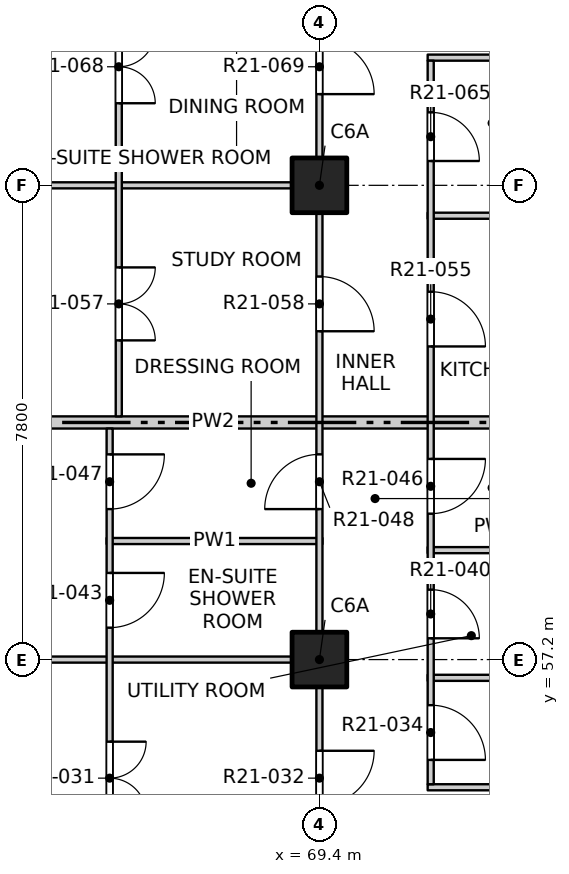
"""IFC4 building model, lengths in metres.
Left out: names, types, materials, properties, quantities, classifications, styles, units other than length and angle.
Written with IfcOpenShell. Run it as: python <this file> out.ifc"""

import sys

from ifc_helpers import new_model, si_unit, direction, frame, frame_2d, origin, origin_2d, place, context, subcontext, project, spatial, rectangle, extrude, element, fill, save


model = new_model("IFC4")
c1 = context("Model", 3, precision=1e-05, world=origin(), true_north=direction((0.0, 1.0)))
c2 = subcontext(c1, "Body", "Model", "MODEL_VIEW")
j1 = project(units=[si_unit("LENGTHUNIT", "METRE"), si_unit("PLANEANGLEUNIT", "RADIAN")], contexts=[c1])
p1 = place(None, origin())
s1 = spatial("IfcSite", under=j1, at=p1, CompositionType="ELEMENT")
p2 = place(p1, origin())
s2 = spatial("IfcBuilding", under=s1, at=p2, CompositionType="ELEMENT")
p3 = place(p2, frame((0.0, 0.0, 221.1)))
s3 = spatial("IfcBuildingStorey", under=s2, at=p3, CompositionType="ELEMENT", Elevation=221.1)
for number, where, z_axis, x_axis in (
    (1, (69.4, 57.2, -0.25), (0.0, 0.0, 1.0), (1.0, 0.0, 0.0)),
    (2, (69.4, 65.0, -0.25), (0.0, 0.0, 1.0), (1.0, 0.0, 0.0)),
):
    element("IfcColumn", number, at=place(p3, frame(where, z_axis=z_axis, x_axis=x_axis)), inside=s3, PredefinedType="COLUMN", context=c2, shape_type="SweptSolid", body=[
        extrude(rectangle(XDim=0.9, YDim=0.9, at=origin_2d()), origin(), (0.0, 0.0, 1.0), 3.4),
    ])
for number, where, z_axis, x_axis in (
    (3, (71.18, 55.1, 0.0), (0.0, 0.0, 1.0), (1.0, 0.0, 0.0)),
    (4, (71.18, 56.9, 0.0), (0.0, 0.0, 1.0), (1.0, 0.0, 0.0)),
):
    element("IfcWall", number, at=place(p3, frame(where, z_axis=z_axis, x_axis=x_axis)), inside=s3, PredefinedType="PARTITIONING", context=c2, shape_type="SweptSolid", body=[
        extrude(rectangle(XDim=2.22, YDim=0.1, at=frame_2d((1.11, 0.0))), origin(), (0.0, 0.0, 1.0), 3.15),
    ])
p4 = place(p3, frame((61.9, 57.2, 0.0), z_axis=(0.0, 0.0, 1.0), x_axis=(1.0, 0.0, 0.0)))
e5 = element("IfcWall", 5, at=p4, inside=s3, PredefinedType="PARTITIONING", context=c2, shape_type="SweptSolid", body=[
    extrude(rectangle(XDim=7.55, YDim=0.1, at=frame_2d((3.775, 0.0))), origin(), (0.0, 0.0, 1.0), 3.15),
])
p5 = place(p3, frame((71.18, 59.0, 0.0), z_axis=(0.0, 0.0, 1.0), x_axis=(1.0, 0.0, 0.0)))
e6 = element("IfcWall", 6, at=p5, inside=s3, PredefinedType="PARTITIONING", context=c2, shape_type="SweptSolid", body=[
    extrude(rectangle(XDim=2.22, YDim=0.1, at=frame_2d((1.11, 0.0))), origin(), (0.0, 0.0, 1.0), 3.15),
])
p6 = place(p3, frame((65.9, 59.15, 0.0), z_axis=(0.0, 0.0, 1.0), x_axis=(1.0, 0.0, 0.0)))
e7 = element("IfcWall", 7, at=p6, inside=s3, PredefinedType="PARTITIONING", context=c2, shape_type="SweptSolid", body=[
    extrude(rectangle(XDim=3.55, YDim=0.1, at=frame_2d((1.775, 0.0))), origin(), (0.0, 0.0, 1.0), 3.15),
])
p7 = place(p3, frame((61.9, 61.1, 0.0), z_axis=(0.0, 0.0, 1.0), x_axis=(1.0, 0.0, 0.0)))
e8 = element("IfcWall", 8, at=p7, inside=s3, PredefinedType="PARTITIONING", context=c2, shape_type="SweptSolid", body=[
    extrude(rectangle(XDim=11.5, YDim=0.2, at=frame_2d((5.75, 0.0))), origin(), (0.0, 0.0, 1.0), 2.55),
])
p8 = place(p3, frame((71.18, 64.5, 0.0), z_axis=(0.0, 0.0, 1.0), x_axis=(1.0, 0.0, 0.0)))
e9 = element("IfcWall", 9, at=p8, inside=s3, PredefinedType="PARTITIONING", context=c2, shape_type="SweptSolid", body=[
    extrude(rectangle(XDim=2.22, YDim=0.1, at=frame_2d((1.11, 0.0))), origin(), (0.0, 0.0, 1.0), 3.15),
])
p9 = place(p3, frame((61.9, 65.0, 0.0), z_axis=(0.0, 0.0, 1.0), x_axis=(1.0, 0.0, 0.0)))
e10 = element("IfcWall", 10, at=p9, inside=s3, PredefinedType="PARTITIONING", context=c2, shape_type="SweptSolid", body=[
    extrude(rectangle(XDim=7.55, YDim=0.1, at=frame_2d((3.775, 0.0))), origin(), (0.0, 0.0, 1.0), 3.15),
])
p10 = place(p3, frame((71.18, 67.1, 0.0), z_axis=(0.0, 0.0, 1.0), x_axis=(1.0, 0.0, 0.0)))
e11 = element("IfcWall", 11, at=p10, inside=s3, PredefinedType="PARTITIONING", context=c2, shape_type="SweptSolid", body=[
    extrude(rectangle(XDim=2.22, YDim=0.1, at=frame_2d((1.11, 0.0))), origin(), (0.0, 0.0, 1.0), 3.15),
])
p11 = place(p3, frame((65.95, 41.9, 0.0), z_axis=(0.0, 0.0, 1.0), x_axis=(0.0, 1.0, 0.0)))
e12 = element("IfcWall", 12, at=p11, inside=s3, PredefinedType="PARTITIONING", context=c2, shape_type="SweptSolid", body=[
    extrude(rectangle(XDim=19.1, YDim=0.1, at=frame_2d((9.55, 0.0))), origin(), (0.0, 0.0, 1.0), 3.15),
])
p12 = place(p11, frame((1.05, 0.0, 0.0)))
e13 = element("IfcOpeningElement", 13, at=p12, cuts=e12, PredefinedType="OPENING", context=c2, shape_type="SweptSolid", body=[
    extrude(rectangle(XDim=1.2, YDim=2.1, at=frame_2d((0.6, 1.05))), frame((0.0, 0.06, 0.0), z_axis=(0.0, -1.0, 0.0), x_axis=(1.0, 0.0, 0.0)), (0.0, 0.0, 1.0), 0.12),
])
p13 = place(p11, frame((4.125, 0.0, 0.0)))
e14 = element("IfcOpeningElement", 14, at=p13, cuts=e12, PredefinedType="OPENING", context=c2, shape_type="SweptSolid", body=[
    extrude(rectangle(XDim=0.9, YDim=2.1, at=frame_2d((0.45, 1.05))), frame((0.0, 0.06, 0.0), z_axis=(0.0, -1.0, 0.0), x_axis=(1.0, 0.0, 0.0)), (0.0, 0.0, 1.0), 0.12),
])
p14 = place(p11, frame((6.075, 0.0, 0.0)))
e15 = element("IfcOpeningElement", 15, at=p14, cuts=e12, PredefinedType="OPENING", context=c2, shape_type="SweptSolid", body=[
    extrude(rectangle(XDim=0.9, YDim=2.1, at=frame_2d((0.45, 1.05))), frame((0.0, 0.06, 0.0), z_axis=(0.0, -1.0, 0.0), x_axis=(1.0, 0.0, 0.0)), (0.0, 0.0, 1.0), 0.12),
])
p15 = place(p11, frame((8.85, 0.0, 0.0)))
e16 = element("IfcOpeningElement", 16, at=p15, cuts=e12, PredefinedType="OPENING", context=c2, shape_type="SweptSolid", body=[
    extrude(rectangle(XDim=1.2, YDim=2.1, at=frame_2d((0.6, 1.05))), frame((0.0, 0.06, 0.0), z_axis=(0.0, -1.0, 0.0), x_axis=(1.0, 0.0, 0.0)), (0.0, 0.0, 1.0), 0.12),
])
p16 = place(p11, frame((12.75, 0.0, 0.0)))
e17 = element("IfcOpeningElement", 17, at=p16, cuts=e12, PredefinedType="OPENING", context=c2, shape_type="SweptSolid", body=[
    extrude(rectangle(XDim=1.2, YDim=2.1, at=frame_2d((0.6, 1.05))), frame((0.0, 0.06, 0.0), z_axis=(0.0, -1.0, 0.0), x_axis=(1.0, 0.0, 0.0)), (0.0, 0.0, 1.0), 0.12),
])
p17 = place(p11, frame((15.825, 0.0, 0.0)))
e18 = element("IfcOpeningElement", 18, at=p17, cuts=e12, PredefinedType="OPENING", context=c2, shape_type="SweptSolid", body=[
    extrude(rectangle(XDim=0.9, YDim=2.1, at=frame_2d((0.45, 1.05))), frame((0.0, 0.06, 0.0), z_axis=(0.0, -1.0, 0.0), x_axis=(1.0, 0.0, 0.0)), (0.0, 0.0, 1.0), 0.12),
])
p18 = place(p11, frame((17.775, 0.0, 0.0)))
e19 = element("IfcOpeningElement", 19, at=p18, cuts=e12, PredefinedType="OPENING", context=c2, shape_type="SweptSolid", body=[
    extrude(rectangle(XDim=0.9, YDim=2.1, at=frame_2d((0.45, 1.05))), frame((0.0, 0.06, 0.0), z_axis=(0.0, -1.0, 0.0), x_axis=(1.0, 0.0, 0.0)), (0.0, 0.0, 1.0), 0.12),
])
p19 = place(p3, frame((66.1, 61.2, 0.0), z_axis=(0.0, 0.0, 1.0), x_axis=(0.0, 1.0, 0.0)))
e20 = element("IfcWall", 20, at=p19, inside=s3, PredefinedType="PARTITIONING", context=c2, shape_type="SweptSolid", body=[
    extrude(rectangle(XDim=26.9, YDim=0.1, at=frame_2d((13.45, 0.0))), origin(), (0.0, 0.0, 1.0), 3.15),
])
p20 = place(p19, frame((1.25, 0.0, 0.0)))
e21 = element("IfcOpeningElement", 21, at=p20, cuts=e20, PredefinedType="OPENING", context=c2, shape_type="SweptSolid", body=[
    extrude(rectangle(XDim=1.2, YDim=2.1, at=frame_2d((0.6, 1.05))), frame((0.0, 0.06, 0.0), z_axis=(0.0, -1.0, 0.0), x_axis=(1.0, 0.0, 0.0)), (0.0, 0.0, 1.0), 0.12),
])
p21 = place(p19, frame((5.15, 0.0, 0.0)))
e22 = element("IfcOpeningElement", 22, at=p21, cuts=e20, PredefinedType="OPENING", context=c2, shape_type="SweptSolid", body=[
    extrude(rectangle(XDim=1.2, YDim=2.1, at=frame_2d((0.6, 1.05))), frame((0.0, 0.06, 0.0), z_axis=(0.0, -1.0, 0.0), x_axis=(1.0, 0.0, 0.0)), (0.0, 0.0, 1.0), 0.12),
])
p22 = place(p19, frame((8.225, 0.0, 0.0)))
e23 = element("IfcOpeningElement", 23, at=p22, cuts=e20, PredefinedType="OPENING", context=c2, shape_type="SweptSolid", body=[
    extrude(rectangle(XDim=0.9, YDim=2.1, at=frame_2d((0.45, 1.05))), frame((0.0, 0.06, 0.0), z_axis=(0.0, -1.0, 0.0), x_axis=(1.0, 0.0, 0.0)), (0.0, 0.0, 1.0), 0.12),
])
p23 = place(p19, frame((10.175, 0.0, 0.0)))
e24 = element("IfcOpeningElement", 24, at=p23, cuts=e20, PredefinedType="OPENING", context=c2, shape_type="SweptSolid", body=[
    extrude(rectangle(XDim=0.9, YDim=2.1, at=frame_2d((0.45, 1.05))), frame((0.0, 0.06, 0.0), z_axis=(0.0, -1.0, 0.0), x_axis=(1.0, 0.0, 0.0)), (0.0, 0.0, 1.0), 0.12),
])
p24 = place(p19, frame((12.125, 0.0, 0.0)))
e25 = element("IfcOpeningElement", 25, at=p24, cuts=e20, PredefinedType="OPENING", context=c2, shape_type="SweptSolid", body=[
    extrude(rectangle(XDim=0.9, YDim=2.1, at=frame_2d((0.45, 1.05))), frame((0.0, 0.06, 0.0), z_axis=(0.0, -1.0, 0.0), x_axis=(1.0, 0.0, 0.0)), (0.0, 0.0, 1.0), 0.12),
])
p25 = place(p19, frame((14.075, 0.0, 0.0)))
e26 = element("IfcOpeningElement", 26, at=p25, cuts=e20, PredefinedType="OPENING", context=c2, shape_type="SweptSolid", body=[
    extrude(rectangle(XDim=0.9, YDim=2.1, at=frame_2d((0.45, 1.05))), frame((0.0, 0.06, 0.0), z_axis=(0.0, -1.0, 0.0), x_axis=(1.0, 0.0, 0.0)), (0.0, 0.0, 1.0), 0.12),
])
p26 = place(p19, frame((16.85, 0.0, 0.0)))
e27 = element("IfcOpeningElement", 27, at=p26, cuts=e20, PredefinedType="OPENING", context=c2, shape_type="SweptSolid", body=[
    extrude(rectangle(XDim=1.2, YDim=2.1, at=frame_2d((0.6, 1.05))), frame((0.0, 0.06, 0.0), z_axis=(0.0, -1.0, 0.0), x_axis=(1.0, 0.0, 0.0)), (0.0, 0.0, 1.0), 0.12),
])
p27 = place(p19, frame((19.925, 0.0, 0.0)))
e28 = element("IfcOpeningElement", 28, at=p27, cuts=e20, PredefinedType="OPENING", context=c2, shape_type="SweptSolid", body=[
    extrude(rectangle(XDim=0.9, YDim=2.1, at=frame_2d((0.45, 1.05))), frame((0.0, 0.06, 0.0), z_axis=(0.0, -1.0, 0.0), x_axis=(1.0, 0.0, 0.0)), (0.0, 0.0, 1.0), 0.12),
])
p28 = place(p19, frame((21.875, 0.0, 0.0)))
e29 = element("IfcOpeningElement", 29, at=p28, cuts=e20, PredefinedType="OPENING", context=c2, shape_type="SweptSolid", body=[
    extrude(rectangle(XDim=0.9, YDim=2.1, at=frame_2d((0.45, 1.05))), frame((0.0, 0.06, 0.0), z_axis=(0.0, -1.0, 0.0), x_axis=(1.0, 0.0, 0.0)), (0.0, 0.0, 1.0), 0.12),
])
p29 = place(p19, frame((24.65, 0.0, 0.0)))
e30 = element("IfcOpeningElement", 30, at=p29, cuts=e20, PredefinedType="OPENING", context=c2, shape_type="SweptSolid", body=[
    extrude(rectangle(XDim=1.2, YDim=2.1, at=frame_2d((0.6, 1.05))), frame((0.0, 0.06, 0.0), z_axis=(0.0, -1.0, 0.0), x_axis=(1.0, 0.0, 0.0)), (0.0, 0.0, 1.0), 0.12),
])
p30 = place(p3, frame((69.4, 41.9, 0.0), z_axis=(0.0, 0.0, 1.0), x_axis=(0.0, 1.0, 0.0)))
e31 = element("IfcWall", 31, at=p30, inside=s3, PredefinedType="PARTITIONING", context=c2, shape_type="SweptSolid", body=[
    extrude(rectangle(XDim=46.2, YDim=0.1, at=frame_2d((23.1, 0.0))), origin(), (0.0, 0.0, 1.0), 3.15),
])
p31 = place(p30, frame((1.2, 0.0, 0.0)))
e32 = element("IfcOpeningElement", 32, at=p31, cuts=e31, PredefinedType="OPENING", context=c2, shape_type="SweptSolid", body=[
    extrude(rectangle(XDim=0.9, YDim=2.1, at=frame_2d((0.45, 1.05))), frame((0.0, 0.06, 0.0), z_axis=(0.0, -1.0, 0.0), x_axis=(1.0, 0.0, 0.0)), (0.0, 0.0, 1.0), 0.12),
])
p32 = place(p30, frame((6.025, 0.0, 0.0)))
e33 = element("IfcOpeningElement", 33, at=p32, cuts=e31, PredefinedType="OPENING", context=c2, shape_type="SweptSolid", body=[
    extrude(rectangle(XDim=0.9, YDim=2.1, at=frame_2d((0.45, 1.05))), frame((0.0, 0.06, 0.0), z_axis=(0.0, -1.0, 0.0), x_axis=(1.0, 0.0, 0.0)), (0.0, 0.0, 1.0), 0.12),
])
p33 = place(p30, frame((9.0, 0.0, 0.0)))
e34 = element("IfcOpeningElement", 34, at=p33, cuts=e31, PredefinedType="OPENING", context=c2, shape_type="SweptSolid", body=[
    extrude(rectangle(XDim=0.9, YDim=2.1, at=frame_2d((0.45, 1.05))), frame((0.0, 0.06, 0.0), z_axis=(0.0, -1.0, 0.0), x_axis=(1.0, 0.0, 0.0)), (0.0, 0.0, 1.0), 0.12),
])
p34 = place(p30, frame((12.9, 0.0, 0.0)))
e35 = element("IfcOpeningElement", 35, at=p34, cuts=e31, PredefinedType="OPENING", context=c2, shape_type="SweptSolid", body=[
    extrude(rectangle(XDim=0.9, YDim=2.1, at=frame_2d((0.45, 1.05))), frame((0.0, 0.06, 0.0), z_axis=(0.0, -1.0, 0.0), x_axis=(1.0, 0.0, 0.0)), (0.0, 0.0, 1.0), 0.12),
])
p35 = place(p30, frame((17.775, 0.0, 0.0)))
e36 = element("IfcOpeningElement", 36, at=p35, cuts=e31, PredefinedType="OPENING", context=c2, shape_type="SweptSolid", body=[
    extrude(rectangle(XDim=0.9, YDim=2.1, at=frame_2d((0.45, 1.05))), frame((0.0, 0.06, 0.0), z_axis=(0.0, -1.0, 0.0), x_axis=(1.0, 0.0, 0.0)), (0.0, 0.0, 1.0), 0.12),
])
p36 = place(p30, frame((20.7, 0.0, 0.0)))
e37 = element("IfcOpeningElement", 37, at=p36, cuts=e31, PredefinedType="OPENING", context=c2, shape_type="SweptSolid", body=[
    extrude(rectangle(XDim=0.9, YDim=2.1, at=frame_2d((0.45, 1.05))), frame((0.0, 0.06, 0.0), z_axis=(0.0, -1.0, 0.0), x_axis=(1.0, 0.0, 0.0)), (0.0, 0.0, 1.0), 0.12),
])
p37 = place(p30, frame((24.6, 0.0, 0.0)))
e38 = element("IfcOpeningElement", 38, at=p37, cuts=e31, PredefinedType="OPENING", context=c2, shape_type="SweptSolid", body=[
    extrude(rectangle(XDim=0.9, YDim=2.1, at=frame_2d((0.45, 1.05))), frame((0.0, 0.06, 0.0), z_axis=(0.0, -1.0, 0.0), x_axis=(1.0, 0.0, 0.0)), (0.0, 0.0, 1.0), 0.12),
])
p38 = place(p30, frame((29.425, 0.0, 0.0)))
e39 = element("IfcOpeningElement", 39, at=p38, cuts=e31, PredefinedType="OPENING", context=c2, shape_type="SweptSolid", body=[
    extrude(rectangle(XDim=0.9, YDim=2.1, at=frame_2d((0.45, 1.05))), frame((0.0, 0.06, 0.0), z_axis=(0.0, -1.0, 0.0), x_axis=(1.0, 0.0, 0.0)), (0.0, 0.0, 1.0), 0.12),
])
p39 = place(p30, frame((33.375, 0.0, 0.0)))
e40 = element("IfcOpeningElement", 40, at=p39, cuts=e31, PredefinedType="OPENING", context=c2, shape_type="SweptSolid", body=[
    extrude(rectangle(XDim=0.9, YDim=2.1, at=frame_2d((0.45, 1.05))), frame((0.0, 0.06, 0.0), z_axis=(0.0, -1.0, 0.0), x_axis=(1.0, 0.0, 0.0)), (0.0, 0.0, 1.0), 0.12),
])
p40 = place(p30, frame((36.3, 0.0, 0.0)))
e41 = element("IfcOpeningElement", 41, at=p40, cuts=e31, PredefinedType="OPENING", context=c2, shape_type="SweptSolid", body=[
    extrude(rectangle(XDim=0.9, YDim=2.1, at=frame_2d((0.45, 1.05))), frame((0.0, 0.06, 0.0), z_axis=(0.0, -1.0, 0.0), x_axis=(1.0, 0.0, 0.0)), (0.0, 0.0, 1.0), 0.12),
])
p41 = place(p30, frame((41.175, 0.0, 0.0)))
e42 = element("IfcOpeningElement", 42, at=p41, cuts=e31, PredefinedType="OPENING", context=c2, shape_type="SweptSolid", body=[
    extrude(rectangle(XDim=0.9, YDim=2.1, at=frame_2d((0.45, 1.05))), frame((0.0, 0.06, 0.0), z_axis=(0.0, -1.0, 0.0), x_axis=(1.0, 0.0, 0.0)), (0.0, 0.0, 1.0), 0.12),
])
p42 = place(p30, frame((44.1, 0.0, 0.0)))
e43 = element("IfcOpeningElement", 43, at=p42, cuts=e31, PredefinedType="OPENING", context=c2, shape_type="SweptSolid", body=[
    extrude(rectangle(XDim=0.9, YDim=2.1, at=frame_2d((0.45, 1.05))), frame((0.0, 0.06, 0.0), z_axis=(0.0, -1.0, 0.0), x_axis=(1.0, 0.0, 0.0)), (0.0, 0.0, 1.0), 0.12),
])
p43 = place(p3, frame((71.23, 55.15, 0.0), z_axis=(0.0, 0.0, 1.0), x_axis=(0.0, 1.0, 0.0)))
e44 = element("IfcWall", 44, at=p43, inside=s3, PredefinedType="PARTITIONING", context=c2, shape_type="SweptSolid", body=[
    extrude(rectangle(XDim=11.9, YDim=0.1, at=frame_2d((5.95, 0.0))), origin(), (0.0, 0.0, 1.0), 3.15),
])
p44 = place(p43, frame((0.4, 0.0, 0.0)))
e45 = element("IfcOpeningElement", 45, at=p44, cuts=e44, PredefinedType="OPENING", context=c2, shape_type="SweptSolid", body=[
    extrude(rectangle(XDim=0.9, YDim=2.1, at=frame_2d((0.45, 1.05))), frame((0.0, 0.06, 0.0), z_axis=(0.0, -1.0, 0.0), x_axis=(1.0, 0.0, 0.0)), (0.0, 0.0, 1.0), 0.12),
])
p45 = place(p43, frame((2.4, 0.0, 0.0)))
e46 = element("IfcOpeningElement", 46, at=p45, cuts=e44, PredefinedType="OPENING", context=c2, shape_type="SweptSolid", body=[
    extrude(rectangle(XDim=0.8, YDim=2.1, at=frame_2d((0.4, 1.05))), frame((0.0, 0.06, 0.0), z_axis=(0.0, -1.0, 0.0), x_axis=(1.0, 0.0, 0.0)), (0.0, 0.0, 1.0), 0.12),
])
p46 = place(p43, frame((4.45, 0.0, 0.0)))
e47 = element("IfcOpeningElement", 47, at=p46, cuts=e44, PredefinedType="OPENING", context=c2, shape_type="SweptSolid", body=[
    extrude(rectangle(XDim=0.9, YDim=2.1, at=frame_2d((0.45, 1.05))), frame((0.0, 0.06, 0.0), z_axis=(0.0, -1.0, 0.0), x_axis=(1.0, 0.0, 0.0)), (0.0, 0.0, 1.0), 0.12),
])
p47 = place(p43, frame((7.2, 0.0, 0.0)))
e48 = element("IfcOpeningElement", 48, at=p47, cuts=e44, PredefinedType="OPENING", context=c2, shape_type="SweptSolid", body=[
    extrude(rectangle(XDim=0.9, YDim=2.1, at=frame_2d((0.45, 1.05))), frame((0.0, 0.06, 0.0), z_axis=(0.0, -1.0, 0.0), x_axis=(1.0, 0.0, 0.0)), (0.0, 0.0, 1.0), 0.12),
])
p48 = place(p43, frame((10.25, 0.0, 0.0)))
e49 = element("IfcOpeningElement", 49, at=p48, cuts=e44, PredefinedType="OPENING", context=c2, shape_type="SweptSolid", body=[
    extrude(rectangle(XDim=0.8, YDim=2.1, at=frame_2d((0.4, 1.05))), frame((0.0, 0.06, 0.0), z_axis=(0.0, -1.0, 0.0), x_axis=(1.0, 0.0, 0.0)), (0.0, 0.0, 1.0), 0.12),
])
p49 = place(p16, origin())
e50 = element("IfcDoor", 50, at=p49, inside=s3, OperationType="DOUBLE_DOOR_SINGLE_SWING", PredefinedType="DOOR", context=c2, shape_type="SweptSolid", body=[
    extrude(rectangle(XDim=1.2, YDim=2.1, at=frame_2d((0.6, 1.05))), frame((0.0, 0.025, 0.0), z_axis=(0.0, -1.0, 0.0), x_axis=(1.0, 0.0, 0.0)), (0.0, 0.0, 1.0), 0.05),
])
fill(e17, e50)
p50 = place(p34, origin())
e51 = element("IfcDoor", 51, at=p50, inside=s3, OperationType="SINGLE_SWING_LEFT", PredefinedType="DOOR", context=c2, shape_type="SweptSolid", body=[
    extrude(rectangle(XDim=0.9, YDim=2.1, at=frame_2d((0.45, 1.05))), frame((0.0, 0.025, 0.0), z_axis=(0.0, -1.0, 0.0), x_axis=(1.0, 0.0, 0.0)), (0.0, 0.0, 1.0), 0.05),
])
fill(e35, e51)
p51 = place(p44, origin())
e52 = element("IfcDoor", 52, at=p51, inside=s3, OperationType="SINGLE_SWING_RIGHT", PredefinedType="DOOR", context=c2, shape_type="SweptSolid", body=[
    extrude(rectangle(XDim=0.9, YDim=2.1, at=frame_2d((0.45, 1.05))), frame((0.0, 0.025, 0.0), z_axis=(0.0, -1.0, 0.0), x_axis=(1.0, 0.0, 0.0)), (0.0, 0.0, 1.0), 0.05),
])
fill(e45, e52)
p52 = place(p45, origin())
e53 = element("IfcDoor", 53, at=p52, inside=s3, OperationType="SINGLE_SWING_RIGHT", PredefinedType="DOOR", context=c2, shape_type="SweptSolid", body=[
    extrude(rectangle(XDim=0.8, YDim=2.1, at=frame_2d((0.4, 1.05))), frame((0.0, 0.025, 0.0), z_axis=(0.0, -1.0, 0.0), x_axis=(1.0, 0.0, 0.0)), (0.0, 0.0, 1.0), 0.05),
])
fill(e46, e53)
p53 = place(p17, origin())
e54 = element("IfcDoor", 54, at=p53, inside=s3, OperationType="SINGLE_SWING_LEFT", PredefinedType="DOOR", context=c2, shape_type="SweptSolid", body=[
    extrude(rectangle(XDim=0.9, YDim=2.1, at=frame_2d((0.45, 1.05))), frame((0.0, 0.025, 0.0), z_axis=(0.0, -1.0, 0.0), x_axis=(1.0, 0.0, 0.0)), (0.0, 0.0, 1.0), 0.05),
])
fill(e18, e54)
p54 = place(p46, origin())
e55 = element("IfcDoor", 55, at=p54, inside=s3, OperationType="SINGLE_SWING_LEFT", PredefinedType="DOOR", context=c2, shape_type="SweptSolid", body=[
    extrude(rectangle(XDim=0.9, YDim=2.1, at=frame_2d((0.45, 1.05))), frame((0.0, 0.025, 0.0), z_axis=(0.0, -1.0, 0.0), x_axis=(1.0, 0.0, 0.0)), (0.0, 0.0, 1.0), 0.05),
])
fill(e47, e55)
p55 = place(p18, origin())
e56 = element("IfcDoor", 56, at=p55, inside=s3, OperationType="SINGLE_SWING_LEFT", PredefinedType="DOOR", context=c2, shape_type="SweptSolid", body=[
    extrude(rectangle(XDim=0.9, YDim=2.1, at=frame_2d((0.45, 1.05))), frame((0.0, 0.025, 0.0), z_axis=(0.0, -1.0, 0.0), x_axis=(1.0, 0.0, 0.0)), (0.0, 0.0, 1.0), 0.05),
])
fill(e19, e56)
p56 = place(p35, origin())
e57 = element("IfcDoor", 57, at=p56, inside=s3, OperationType="SINGLE_SWING_LEFT", PredefinedType="DOOR", context=c2, shape_type="SweptSolid", body=[
    extrude(rectangle(XDim=0.9, YDim=2.1, at=frame_2d((0.45, 1.05))), frame((0.0, 0.025, 0.0), z_axis=(0.0, -1.0, 0.0), x_axis=(1.0, 0.0, 0.0)), (0.0, 0.0, 1.0), 0.05),
])
fill(e36, e57)
p57 = place(p47, origin())
e58 = element("IfcDoor", 58, at=p57, inside=s3, OperationType="SINGLE_SWING_RIGHT", PredefinedType="DOOR", context=c2, shape_type="SweptSolid", body=[
    extrude(rectangle(XDim=0.9, YDim=2.1, at=frame_2d((0.45, 1.05))), frame((0.0, 0.025, 0.0), z_axis=(0.0, -1.0, 0.0), x_axis=(1.0, 0.0, 0.0)), (0.0, 0.0, 1.0), 0.05),
])
fill(e48, e58)
p58 = place(p20, origin())
e59 = element("IfcDoor", 59, at=p58, inside=s3, OperationType="DOUBLE_DOOR_SINGLE_SWING", PredefinedType="DOOR", context=c2, shape_type="SweptSolid", body=[
    extrude(rectangle(XDim=1.2, YDim=2.1, at=frame_2d((0.6, 1.05))), frame((0.0, 0.025, 0.0), z_axis=(0.0, -1.0, 0.0), x_axis=(1.0, 0.0, 0.0)), (0.0, 0.0, 1.0), 0.05),
])
fill(e21, e59)
p59 = place(p36, origin())
e60 = element("IfcDoor", 60, at=p59, inside=s3, OperationType="SINGLE_SWING_RIGHT", PredefinedType="DOOR", context=c2, shape_type="SweptSolid", body=[
    extrude(rectangle(XDim=0.9, YDim=2.1, at=frame_2d((0.45, 1.05))), frame((0.0, 0.025, 0.0), z_axis=(0.0, -1.0, 0.0), x_axis=(1.0, 0.0, 0.0)), (0.0, 0.0, 1.0), 0.05),
])
fill(e37, e60)
p60 = place(p48, origin())
e61 = element("IfcDoor", 61, at=p60, inside=s3, OperationType="SINGLE_SWING_RIGHT", PredefinedType="DOOR", context=c2, shape_type="SweptSolid", body=[
    extrude(rectangle(XDim=0.8, YDim=2.1, at=frame_2d((0.4, 1.05))), frame((0.0, 0.025, 0.0), z_axis=(0.0, -1.0, 0.0), x_axis=(1.0, 0.0, 0.0)), (0.0, 0.0, 1.0), 0.05),
])
fill(e49, e61)
p61 = place(p21, origin())
e62 = element("IfcDoor", 62, at=p61, inside=s3, OperationType="DOUBLE_DOOR_SINGLE_SWING", PredefinedType="DOOR", context=c2, shape_type="SweptSolid", body=[
    extrude(rectangle(XDim=1.2, YDim=2.1, at=frame_2d((0.6, 1.05))), frame((0.0, 0.025, 0.0), z_axis=(0.0, -1.0, 0.0), x_axis=(1.0, 0.0, 0.0)), (0.0, 0.0, 1.0), 0.05),
])
fill(e22, e62)
p62 = place(p37, origin())
e63 = element("IfcDoor", 63, at=p62, inside=s3, OperationType="SINGLE_SWING_RIGHT", PredefinedType="DOOR", context=c2, shape_type="SweptSolid", body=[
    extrude(rectangle(XDim=0.9, YDim=2.1, at=frame_2d((0.45, 1.05))), frame((0.0, 0.025, 0.0), z_axis=(0.0, -1.0, 0.0), x_axis=(1.0, 0.0, 0.0)), (0.0, 0.0, 1.0), 0.05),
])
fill(e38, e63)
save(model, sys.argv[1])
